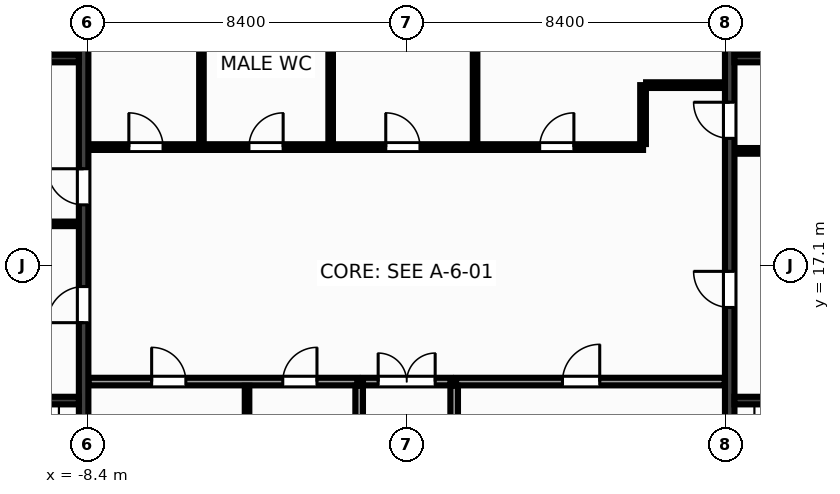
"""IFC4 building model, lengths in metres.
Left out: names, types, materials, properties, quantities, classifications, styles, units other than length and angle.
Written with IfcOpenShell. Run it as: python <this file> out.ifc"""

import sys

from ifc_helpers import new_model, si_unit, direction, frame, frame_2d, origin, place, context, subcontext, project, spatial, rectangle, extrude, source, transform, mapped, element, fill, save


model = new_model("IFC4")
c1 = context("Model", 3, precision=1e-05, world=origin(), true_north=direction((0.0, 1.0)))
c2 = subcontext(c1, "Body", "Model", "MODEL_VIEW")
j1 = project(units=[si_unit("LENGTHUNIT", "METRE"), si_unit("PLANEANGLEUNIT", "RADIAN")], contexts=[c1])
p1 = place(None, origin())
s1 = spatial("IfcSite", under=j1, at=p1, CompositionType="ELEMENT")
p2 = place(p1, origin())
s2 = spatial("IfcBuilding", under=s1, at=p2, CompositionType="ELEMENT")
p3 = place(p2, frame((0.0, 0.0, -5.5)))
s3 = spatial("IfcBuildingStorey", under=s2, at=p3, CompositionType="ELEMENT", Elevation=-5.5)
m1 = source(origin(), c2, "Body", "SweptSolid", [
    extrude(rectangle(XDim=12.8, YDim=0.25, at=frame_2d((6.4, 0.0))), origin(), (0.0, 0.0, 1.0), 5.5),
])
p4 = place(p3, frame((-8.5, 10.6, 0.0), z_axis=(0.0, 0.0, 1.0), x_axis=(0.0, 1.0, 0.0)))
e1 = element("IfcWall", 1, at=p4, inside=s3, PredefinedType="SHEAR", context=c2, shape_type="MappedRepresentation", body=[
    mapped(m1, transform((0.0, 0.0, 0.0), x_axis=(1.0, 0.0, 0.0), y_axis=(0.0, 1.0, 0.0), z_axis=(0.0, 0.0, 1.0), scale=1.0)),
])
p5 = place(p4, frame((5.0, 0.0, 0.0)))
e2 = element("IfcOpeningElement", 2, at=p5, cuts=e1, PredefinedType="OPENING", context=c2, shape_type="SweptSolid", body=[
    extrude(rectangle(XDim=0.95, YDim=2.15, at=frame_2d((0.475, 1.075))), frame((0.0, 0.137, 0.0), z_axis=(0.0, -1.0, 0.0), x_axis=(1.0, 0.0, 0.0)), (0.0, 0.0, 1.0), 0.274),
])
p6 = place(p4, frame((8.1, 0.0, 0.0)))
e3 = element("IfcOpeningElement", 3, at=p6, cuts=e1, PredefinedType="OPENING", context=c2, shape_type="SweptSolid", body=[
    extrude(rectangle(XDim=0.95, YDim=2.15, at=frame_2d((0.475, 1.075))), frame((0.0, 0.137, 0.0), z_axis=(0.0, -1.0, 0.0), x_axis=(1.0, 0.0, 0.0)), (0.0, 0.0, 1.0), 0.274),
])
p7 = place(p3, frame((8.5, 10.6, 0.0), z_axis=(0.0, 0.0, 1.0), x_axis=(0.0, 1.0, 0.0)))
e4 = element("IfcWall", 4, at=p7, inside=s3, PredefinedType="SHEAR", context=c2, shape_type="MappedRepresentation", body=[
    mapped(m1, transform((0.0, 0.0, 0.0), x_axis=(1.0, 0.0, 0.0), y_axis=(0.0, 1.0, 0.0), z_axis=(0.0, 0.0, 1.0), scale=1.0)),
])
p8 = place(p7, frame((5.4, 0.0, 0.0)))
e5 = element("IfcOpeningElement", 5, at=p8, cuts=e4, PredefinedType="OPENING", context=c2, shape_type="SweptSolid", body=[
    extrude(rectangle(XDim=0.95, YDim=2.15, at=frame_2d((0.475, 1.075))), frame((0.0, 0.137, 0.0), z_axis=(0.0, -1.0, 0.0), x_axis=(1.0, 0.0, 0.0)), (0.0, 0.0, 1.0), 0.274),
])
p9 = place(p7, frame((9.85, 0.0, 0.0)))
e6 = element("IfcOpeningElement", 6, at=p9, cuts=e4, PredefinedType="OPENING", context=c2, shape_type="SweptSolid", body=[
    extrude(rectangle(XDim=0.95, YDim=2.15, at=frame_2d((0.475, 1.075))), frame((0.0, 0.137, 0.0), z_axis=(0.0, -1.0, 0.0), x_axis=(1.0, 0.0, 0.0)), (0.0, 0.0, 1.0), 0.274),
])
m2 = source(origin(), c2, "Body", "SweptSolid", [
    extrude(rectangle(XDim=2.825, YDim=0.2, at=frame_2d((1.413, 0.0))), origin(), (0.0, 0.0, 1.0), 5.5),
])
for number, where, z_axis, x_axis in (
    (7, (-11.45, 13.55, 0.0), (0.0, 0.0, 1.0), (1.0, 0.0, 0.0)),
    (8, (8.625, 13.55, 0.0), (0.0, 0.0, 1.0), (1.0, 0.0, 0.0)),
):
    element("IfcWall", number, at=place(p3, frame(where, z_axis=z_axis, x_axis=x_axis)), inside=s3, PredefinedType="SHEAR", context=c2, shape_type="MappedRepresentation", body=[
        mapped(m2, transform((0.0, 0.0, 0.0), x_axis=(1.0, 0.0, 0.0), y_axis=(0.0, 1.0, 0.0), z_axis=(0.0, 0.0, 1.0), scale=1.0)),
    ])
m3 = source(origin(), c2, "Body", "SweptSolid", [
    extrude(rectangle(XDim=3.02, YDim=0.2, at=frame_2d((1.51, 0.0))), origin(), (0.0, 0.0, 1.0), 5.5),
])
for number, where, z_axis, x_axis in (
    (9, (-11.645, 22.55, 0.0), (0.0, 0.0, 1.0), (1.0, 0.0, 0.0)),
    (10, (8.625, 22.55, 0.0), (0.0, 0.0, 1.0), (1.0, 0.0, 0.0)),
):
    element("IfcWall", number, at=place(p3, frame(where, z_axis=z_axis, x_axis=x_axis)), inside=s3, PredefinedType="SHEAR", context=c2, shape_type="MappedRepresentation", body=[
        mapped(m3, transform((0.0, 0.0, 0.0), x_axis=(1.0, 0.0, 0.0), y_axis=(0.0, 1.0, 0.0), z_axis=(0.0, 0.0, 1.0), scale=1.0)),
    ])
m4 = source(origin(), c2, "Body", "SweptSolid", [
    extrude(rectangle(XDim=3.01, YDim=0.12, at=frame_2d((1.505, 0.0))), origin(), (0.0, 0.0, 1.0), 5.14),
])
p10 = place(p3, frame((-11.64, 18.2, 0.0), z_axis=(0.0, 0.0, 1.0), x_axis=(1.0, 0.0, 0.0)))
e11 = element("IfcWall", 11, at=p10, inside=s3, PredefinedType="PARTITIONING", context=c2, shape_type="MappedRepresentation", body=[
    mapped(m4, transform((0.0, 0.0, 0.0), x_axis=(1.0, 0.0, 0.0), y_axis=(0.0, 1.0, 0.0), z_axis=(0.0, 0.0, 1.0), scale=1.0)),
])
m5 = source(origin(), c2, "Body", "SweptSolid", [
    extrude(rectangle(XDim=3.01, YDim=0.15, at=frame_2d((1.505, 0.0))), origin(), (0.0, 0.0, 1.0), 5.14),
])
p11 = place(p3, frame((8.63, 20.12, 0.0), z_axis=(0.0, 0.0, 1.0), x_axis=(1.0, 0.0, 0.0)))
e12 = element("IfcWall", 12, at=p11, inside=s3, PredefinedType="PARTITIONING", context=c2, shape_type="MappedRepresentation", body=[
    mapped(m5, transform((0.0, 0.0, 0.0), x_axis=(1.0, 0.0, 0.0), y_axis=(0.0, 1.0, 0.0), z_axis=(0.0, 0.0, 1.0), scale=1.0)),
])
m6 = source(origin(), c2, "Body", "SweptSolid", [
    extrude(rectangle(XDim=7.07, YDim=0.2, at=frame_2d((3.535, 0.0))), origin(), (0.0, 0.0, 1.0), 5.14),
])
p12 = place(p3, frame((-8.37, 14.05, 0.0), z_axis=(0.0, 0.0, 1.0), x_axis=(1.0, 0.0, 0.0)))
e13 = element("IfcWall", 13, at=p12, inside=s3, PredefinedType="PARTITIONING", context=c2, shape_type="MappedRepresentation", body=[
    mapped(m6, transform((0.0, 0.0, 0.0), x_axis=(1.0, 0.0, 0.0), y_axis=(0.0, 1.0, 0.0), z_axis=(0.0, 0.0, 1.0), scale=1.0)),
])
p13 = place(p12, frame((1.66, 0.0, 0.0)))
e14 = element("IfcOpeningElement", 14, at=p13, cuts=e13, PredefinedType="OPENING", context=c2, shape_type="SweptSolid", body=[
    extrude(rectangle(XDim=0.9, YDim=2.15, at=frame_2d((0.45, 1.075))), frame((0.0, 0.112, 0.0), z_axis=(0.0, -1.0, 0.0), x_axis=(1.0, 0.0, 0.0)), (0.0, 0.0, 1.0), 0.224),
])
p14 = place(p12, frame((5.11, 0.0, 0.0)))
e15 = element("IfcOpeningElement", 15, at=p14, cuts=e13, PredefinedType="OPENING", context=c2, shape_type="SweptSolid", body=[
    extrude(rectangle(XDim=0.9, YDim=2.15, at=frame_2d((0.45, 1.075))), frame((0.0, 0.112, 0.0), z_axis=(0.0, -1.0, 0.0), x_axis=(1.0, 0.0, 0.0)), (0.0, 0.0, 1.0), 0.224),
])
p15 = place(p3, frame((1.3, 14.05, 0.0), z_axis=(0.0, 0.0, 1.0), x_axis=(1.0, 0.0, 0.0)))
e16 = element("IfcWall", 16, at=p15, inside=s3, PredefinedType="PARTITIONING", context=c2, shape_type="MappedRepresentation", body=[
    mapped(m6, transform((0.0, 0.0, 0.0), x_axis=(1.0, 0.0, 0.0), y_axis=(0.0, 1.0, 0.0), z_axis=(0.0, 0.0, 1.0), scale=1.0)),
])
p16 = place(p15, frame((2.8, 0.0, 0.0)))
e17 = element("IfcOpeningElement", 17, at=p16, cuts=e16, PredefinedType="OPENING", context=c2, shape_type="SweptSolid", body=[
    extrude(rectangle(XDim=0.98, YDim=2.15, at=frame_2d((0.49, 1.075))), frame((0.0, 0.112, 0.0), z_axis=(0.0, -1.0, 0.0), x_axis=(1.0, 0.0, 0.0)), (0.0, 0.0, 1.0), 0.224),
])
m7 = source(origin(), c2, "Body", "SweptSolid", [
    extrude(rectangle(XDim=3.34, YDim=0.2, at=frame_2d((1.67, 0.0))), origin(), (0.0, 0.0, 1.0), 5.14),
])
for number, where, z_axis, x_axis in (
    (18, (-1.25, 10.6, 0.0), (0.0, 0.0, 1.0), (0.0, 1.0, 0.0)),
    (19, (1.25, 10.6, 0.0), (0.0, 0.0, 1.0), (0.0, 1.0, 0.0)),
):
    element("IfcWall", number, at=place(p3, frame(where, z_axis=z_axis, x_axis=x_axis)), inside=s3, PredefinedType="PARTITIONING", context=c2, shape_type="MappedRepresentation", body=[
        mapped(m7, transform((0.0, 0.0, 0.0), x_axis=(1.0, 0.0, 0.0), y_axis=(0.0, 1.0, 0.0), z_axis=(0.0, 0.0, 1.0), scale=1.0)),
    ])
m8 = source(origin(), c2, "Body", "SweptSolid", [
    extrude(rectangle(XDim=2.3, YDim=0.2, at=frame_2d((1.15, 0.0))), origin(), (0.0, 0.0, 1.0), 5.14),
])
p17 = place(p3, frame((-1.15, 14.05, 0.0), z_axis=(0.0, 0.0, 1.0), x_axis=(1.0, 0.0, 0.0)))
e20 = element("IfcWall", 20, at=p17, inside=s3, PredefinedType="PARTITIONING", context=c2, shape_type="MappedRepresentation", body=[
    mapped(m8, transform((0.0, 0.0, 0.0), x_axis=(1.0, 0.0, 0.0), y_axis=(0.0, 1.0, 0.0), z_axis=(0.0, 0.0, 1.0), scale=1.0)),
])
p18 = place(p17, frame((0.4, 0.0, 0.0)))
e21 = element("IfcOpeningElement", 21, at=p18, cuts=e20, PredefinedType="OPENING", context=c2, shape_type="SweptSolid", body=[
    extrude(rectangle(XDim=1.5, YDim=2.2, at=frame_2d((0.75, 1.1))), frame((0.0, 0.112, 0.0), z_axis=(0.0, -1.0, 0.0), x_axis=(1.0, 0.0, 0.0)), (0.0, 0.0, 1.0), 0.224),
])
m9 = source(origin(), c2, "Body", "SweptSolid", [
    extrude(rectangle(XDim=14.59, YDim=0.15, at=frame_2d((7.295, 0.0))), origin(), (0.0, 0.0, 1.0), 5.14),
])
p19 = place(p3, frame((-8.37, 20.22, 0.0), z_axis=(0.0, 0.0, 1.0), x_axis=(1.0, 0.0, 0.0)))
e22 = element("IfcWall", 22, at=p19, inside=s3, PredefinedType="PARTITIONING", context=c2, shape_type="MappedRepresentation", body=[
    mapped(m9, transform((0.0, 0.0, 0.0), x_axis=(1.0, 0.0, 0.0), y_axis=(0.0, 1.0, 0.0), z_axis=(0.0, 0.0, 1.0), scale=1.0)),
])
p20 = place(p19, frame((1.06, 0.0, 0.0)))
e23 = element("IfcOpeningElement", 23, at=p20, cuts=e22, PredefinedType="OPENING", context=c2, shape_type="SweptSolid", body=[
    extrude(rectangle(XDim=0.9, YDim=2.15, at=frame_2d((0.45, 1.075))), frame((0.0, 0.087, 0.0), z_axis=(0.0, -1.0, 0.0), x_axis=(1.0, 0.0, 0.0)), (0.0, 0.0, 1.0), 0.174),
])
p21 = place(p19, frame((4.22, 0.0, 0.0)))
e24 = element("IfcOpeningElement", 24, at=p21, cuts=e22, PredefinedType="OPENING", context=c2, shape_type="SweptSolid", body=[
    extrude(rectangle(XDim=0.9, YDim=2.15, at=frame_2d((0.45, 1.075))), frame((0.0, 0.087, 0.0), z_axis=(0.0, -1.0, 0.0), x_axis=(1.0, 0.0, 0.0)), (0.0, 0.0, 1.0), 0.174),
])
p22 = place(p19, frame((7.82, 0.0, 0.0)))
e25 = element("IfcOpeningElement", 25, at=p22, cuts=e22, PredefinedType="OPENING", context=c2, shape_type="SweptSolid", body=[
    extrude(rectangle(XDim=0.9, YDim=2.15, at=frame_2d((0.45, 1.075))), frame((0.0, 0.087, 0.0), z_axis=(0.0, -1.0, 0.0), x_axis=(1.0, 0.0, 0.0)), (0.0, 0.0, 1.0), 0.174),
])
p23 = place(p19, frame((11.87, 0.0, 0.0)))
e26 = element("IfcOpeningElement", 26, at=p23, cuts=e22, PredefinedType="OPENING", context=c2, shape_type="SweptSolid", body=[
    extrude(rectangle(XDim=0.9, YDim=2.15, at=frame_2d((0.45, 1.075))), frame((0.0, 0.087, 0.0), z_axis=(0.0, -1.0, 0.0), x_axis=(1.0, 0.0, 0.0)), (0.0, 0.0, 1.0), 0.174),
])
m10 = source(origin(), c2, "Body", "SweptSolid", [
    extrude(rectangle(XDim=1.55, YDim=0.15, at=frame_2d((0.775, 0.0))), origin(), (0.0, 0.0, 1.0), 5.14),
])
p24 = place(p3, frame((6.22, 20.3, 0.0), z_axis=(0.0, 0.0, 1.0), x_axis=(0.0, 1.0, 0.0)))
e27 = element("IfcWall", 27, at=p24, inside=s3, PredefinedType="PARTITIONING", context=c2, shape_type="MappedRepresentation", body=[
    mapped(m10, transform((0.0, 0.0, 0.0), x_axis=(1.0, 0.0, 0.0), y_axis=(0.0, 1.0, 0.0), z_axis=(0.0, 0.0, 1.0), scale=1.0)),
])
m11 = source(origin(), c2, "Body", "SweptSolid", [
    extrude(rectangle(XDim=2.07, YDim=0.15, at=frame_2d((1.035, 0.0))), origin(), (0.0, 0.0, 1.0), 5.14),
])
p25 = place(p3, frame((6.3, 21.85, 0.0), z_axis=(0.0, 0.0, 1.0), x_axis=(1.0, 0.0, 0.0)))
e28 = element("IfcWall", 28, at=p25, inside=s3, PredefinedType="PARTITIONING", context=c2, shape_type="MappedRepresentation", body=[
    mapped(m11, transform((0.0, 0.0, 0.0), x_axis=(1.0, 0.0, 0.0), y_axis=(0.0, 1.0, 0.0), z_axis=(0.0, 0.0, 1.0), scale=1.0)),
])
m12 = source(origin(), c2, "Body", "SweptSolid", [
    extrude(rectangle(XDim=3.34, YDim=0.12, at=frame_2d((1.67, 0.0))), origin(), (0.0, 0.0, 1.0), 5.14),
])
p26 = place(p3, frame((-4.2, 10.6, 0.0), z_axis=(0.0, 0.0, 1.0), x_axis=(0.0, 1.0, 0.0)))
e29 = element("IfcWall", 29, at=p26, inside=s3, PredefinedType="PARTITIONING", context=c2, shape_type="MappedRepresentation", body=[
    mapped(m12, transform((0.0, 0.0, 0.0), x_axis=(1.0, 0.0, 0.0), y_axis=(0.0, 1.0, 0.0), z_axis=(0.0, 0.0, 1.0), scale=1.0)),
])
m13 = source(origin(), c2, "Body", "SweptSolid", [
    extrude(rectangle(XDim=3.04, YDim=0.12, at=frame_2d((1.52, 0.0))), origin(), (0.0, 0.0, 1.0), 5.14),
])
for number, where, z_axis, x_axis in (
    (30, (-5.4, 20.32, 0.0), (0.0, 0.0, 1.0), (0.0, 1.0, 0.0)),
    (31, (-2.0, 20.32, 0.0), (0.0, 0.0, 1.0), (0.0, 1.0, 0.0)),
    (32, (1.8, 20.32, 0.0), (0.0, 0.0, 1.0), (0.0, 1.0, 0.0)),
):
    element("IfcWall", number, at=place(p3, frame(where, z_axis=z_axis, x_axis=x_axis)), inside=s3, PredefinedType="PARTITIONING", context=c2, shape_type="MappedRepresentation", body=[
        mapped(m13, transform((0.0, 0.0, 0.0), x_axis=(1.0, 0.0, 0.0), y_axis=(0.0, 1.0, 0.0), z_axis=(0.0, 0.0, 1.0), scale=1.0)),
    ])
m14 = source(origin(), c2, "Body", "SweptSolid", [
    extrude(rectangle(XDim=0.95, YDim=2.15, at=frame_2d((0.475, 1.075))), frame((0.0, 0.025, 0.0), z_axis=(0.0, -1.0, 0.0), x_axis=(1.0, 0.0, 0.0)), (0.0, 0.0, 1.0), 0.05),
])
p27 = place(p5, origin())
e33 = element("IfcDoor", 33, at=p27, inside=s3, OperationType="SINGLE_SWING_LEFT", PredefinedType="DOOR", context=c2, shape_type="MappedRepresentation", body=[
    mapped(m14, transform((0.0, 0.0, 0.0), x_axis=(1.0, 0.0, 0.0), y_axis=(0.0, 1.0, 0.0), z_axis=(0.0, 0.0, 1.0), scale=1.0)),
])
fill(e2, e33)
p28 = place(p6, origin())
e34 = element("IfcDoor", 34, at=p28, inside=s3, OperationType="SINGLE_SWING_RIGHT", PredefinedType="DOOR", context=c2, shape_type="MappedRepresentation", body=[
    mapped(m14, transform((0.0, 0.0, 0.0), x_axis=(1.0, 0.0, 0.0), y_axis=(0.0, 1.0, 0.0), z_axis=(0.0, 0.0, 1.0), scale=1.0)),
])
fill(e3, e34)
p29 = place(p8, origin())
e35 = element("IfcDoor", 35, at=p29, inside=s3, OperationType="SINGLE_SWING_RIGHT", PredefinedType="DOOR", context=c2, shape_type="MappedRepresentation", body=[
    mapped(m14, transform((0.0, 0.0, 0.0), x_axis=(1.0, 0.0, 0.0), y_axis=(0.0, 1.0, 0.0), z_axis=(0.0, 0.0, 1.0), scale=1.0)),
])
fill(e5, e35)
m15 = source(origin(), c2, "Body", "SweptSolid", [
    extrude(rectangle(XDim=0.95, YDim=2.15, at=frame_2d((0.475, 1.075))), frame((0.0, 0.025, 0.0), z_axis=(0.0, -1.0, 0.0), x_axis=(1.0, 0.0, 0.0)), (0.0, 0.0, 1.0), 0.05),
])
p30 = place(p9, origin())
e36 = element("IfcDoor", 36, at=p30, inside=s3, OperationType="SINGLE_SWING_RIGHT", PredefinedType="DOOR", context=c2, shape_type="MappedRepresentation", body=[
    mapped(m15, transform((0.0, 0.0, 0.0), x_axis=(1.0, 0.0, 0.0), y_axis=(0.0, 1.0, 0.0), z_axis=(0.0, 0.0, 1.0), scale=1.0)),
])
fill(e6, e36)
m16 = source(origin(), c2, "Body", "SweptSolid", [
    extrude(rectangle(XDim=0.9, YDim=2.15, at=frame_2d((0.45, 1.075))), frame((0.0, 0.025, 0.0), z_axis=(0.0, -1.0, 0.0), x_axis=(1.0, 0.0, 0.0)), (0.0, 0.0, 1.0), 0.05),
])
p31 = place(p13, origin())
e37 = element("IfcDoor", 37, at=p31, inside=s3, OperationType="SINGLE_SWING_LEFT", PredefinedType="DOOR", context=c2, shape_type="MappedRepresentation", body=[
    mapped(m16, transform((0.0, 0.0, 0.0), x_axis=(1.0, 0.0, 0.0), y_axis=(0.0, 1.0, 0.0), z_axis=(0.0, 0.0, 1.0), scale=1.0)),
])
fill(e14, e37)
p32 = place(p14, origin())
e38 = element("IfcDoor", 38, at=p32, inside=s3, OperationType="SINGLE_SWING_RIGHT", PredefinedType="DOOR", context=c2, shape_type="MappedRepresentation", body=[
    mapped(m16, transform((0.0, 0.0, 0.0), x_axis=(1.0, 0.0, 0.0), y_axis=(0.0, 1.0, 0.0), z_axis=(0.0, 0.0, 1.0), scale=1.0)),
])
fill(e15, e38)
m17 = source(origin(), c2, "Body", "SweptSolid", [
    extrude(rectangle(XDim=0.98, YDim=2.15, at=frame_2d((0.49, 1.075))), frame((0.0, 0.025, 0.0), z_axis=(0.0, -1.0, 0.0), x_axis=(1.0, 0.0, 0.0)), (0.0, 0.0, 1.0), 0.05),
])
p33 = place(p16, origin())
e39 = element("IfcDoor", 39, at=p33, inside=s3, OperationType="SINGLE_SWING_RIGHT", PredefinedType="DOOR", context=c2, shape_type="MappedRepresentation", body=[
    mapped(m17, transform((0.0, 0.0, 0.0), x_axis=(1.0, 0.0, 0.0), y_axis=(0.0, 1.0, 0.0), z_axis=(0.0, 0.0, 1.0), scale=1.0)),
])
fill(e17, e39)
m18 = source(origin(), c2, "Body", "SweptSolid", [
    extrude(rectangle(XDim=1.5, YDim=2.2, at=frame_2d((0.75, 1.1))), frame((0.0, 0.025, 0.0), z_axis=(0.0, -1.0, 0.0), x_axis=(1.0, 0.0, 0.0)), (0.0, 0.0, 1.0), 0.05),
])
p34 = place(p18, origin())
e40 = element("IfcDoor", 40, at=p34, inside=s3, OperationType="DOUBLE_DOOR_SINGLE_SWING", PredefinedType="DOOR", context=c2, shape_type="MappedRepresentation", body=[
    mapped(m18, transform((0.0, 0.0, 0.0), x_axis=(1.0, 0.0, 0.0), y_axis=(0.0, 1.0, 0.0), z_axis=(0.0, 0.0, 1.0), scale=1.0)),
])
fill(e21, e40)
p35 = place(p20, origin())
e41 = element("IfcDoor", 41, at=p35, inside=s3, OperationType="SINGLE_SWING_LEFT", PredefinedType="DOOR", context=c2, shape_type="MappedRepresentation", body=[
    mapped(m16, transform((0.0, 0.0, 0.0), x_axis=(1.0, 0.0, 0.0), y_axis=(0.0, 1.0, 0.0), z_axis=(0.0, 0.0, 1.0), scale=1.0)),
])
fill(e23, e41)
p36 = place(p21, origin())
e42 = element("IfcDoor", 42, at=p36, inside=s3, OperationType="SINGLE_SWING_RIGHT", PredefinedType="DOOR", context=c2, shape_type="MappedRepresentation", body=[
    mapped(m16, transform((0.0, 0.0, 0.0), x_axis=(1.0, 0.0, 0.0), y_axis=(0.0, 1.0, 0.0), z_axis=(0.0, 0.0, 1.0), scale=1.0)),
])
fill(e24, e42)
p37 = place(p22, origin())
e43 = element("IfcDoor", 43, at=p37, inside=s3, OperationType="SINGLE_SWING_LEFT", PredefinedType="DOOR", context=c2, shape_type="MappedRepresentation", body=[
    mapped(m16, transform((0.0, 0.0, 0.0), x_axis=(1.0, 0.0, 0.0), y_axis=(0.0, 1.0, 0.0), z_axis=(0.0, 0.0, 1.0), scale=1.0)),
])
fill(e25, e43)
p38 = place(p23, origin())
e44 = element("IfcDoor", 44, at=p38, inside=s3, OperationType="SINGLE_SWING_RIGHT", PredefinedType="DOOR", context=c2, shape_type="MappedRepresentation", body=[
    mapped(m16, transform((0.0, 0.0, 0.0), x_axis=(1.0, 0.0, 0.0), y_axis=(0.0, 1.0, 0.0), z_axis=(0.0, 0.0, 1.0), scale=1.0)),
])
fill(e26, e44)
save(model, sys.argv[1])
